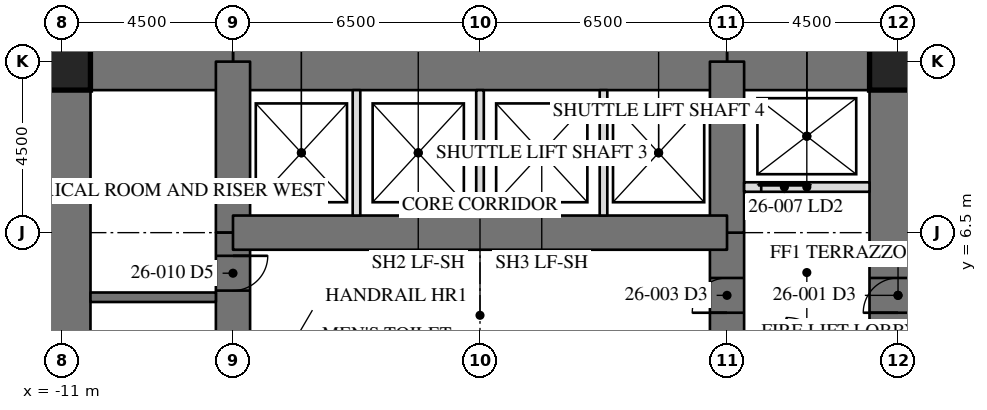
"""IFC4 building model, lengths in metres.
Left out: names, types, materials, properties, quantities, classifications, styles, units other than length and angle.
Written with IfcOpenShell. Run it as: python <this file> out.ifc"""

import sys

from ifc_helpers import new_model, si_unit, direction, frame, frame_2d, origin, origin_2d, place, context, subcontext, project, spatial, rectangle, hollow_rectangle, extrude, element, fill, save


model = new_model("IFC4")
c1 = context("Model", 3, precision=1e-05, world=origin(), true_north=direction((0.0, 1.0)))
c2 = subcontext(c1, "Body", "Model", "MODEL_VIEW")
j1 = project(units=[si_unit("LENGTHUNIT", "METRE"), si_unit("PLANEANGLEUNIT", "RADIAN")], contexts=[c1])
p1 = place(None, origin())
s1 = spatial("IfcSite", under=j1, at=p1, CompositionType="ELEMENT")
p2 = place(p1, origin())
s2 = spatial("IfcBuilding", under=s1, at=p2, CompositionType="ELEMENT")
p3 = place(p2, frame((0.0, 0.0, 113.1)))
s3 = spatial("IfcBuildingStorey", under=s2, at=p3, CompositionType="ELEMENT", Elevation=113.1)
p4 = place(p3, frame((11.0, -11.0, 0.0), z_axis=(0.0, 0.0, 1.0), x_axis=(0.0, 1.0, 0.0)))
e1 = element("IfcWall", 1, at=p4, inside=s3, PredefinedType="SHEAR", context=c2, shape_type="SweptSolid", body=[
    extrude(rectangle(XDim=22.0, YDim=1.5, at=frame_2d((11.0, 0.0))), origin(), (0.0, 0.0, 1.0), 4.1),
])
p5 = place(p4, frame((15.393, 0.0, 0.0)))
e2 = element("IfcOpeningElement", 2, at=p5, cuts=e1, PredefinedType="OPENING", context=c2, shape_type="SweptSolid", body=[
    extrude(rectangle(XDim=0.915, YDim=2.134, at=frame_2d((0.458, 1.067))), frame((0.0, 0.76, 0.0), z_axis=(0.0, -1.0, 0.0), x_axis=(1.0, 0.0, 0.0)), (0.0, 0.0, 1.0), 1.52),
])
p6 = place(p3, frame((-11.0, 11.0, 0.0), z_axis=(0.0, 0.0, 1.0), x_axis=(0.0, -1.0, 0.0)))
e3 = element("IfcWall", 3, at=p6, inside=s3, PredefinedType="SHEAR", context=c2, shape_type="SweptSolid", body=[
    extrude(rectangle(XDim=22.0, YDim=1.5, at=frame_2d((11.0, 0.0))), origin(), (0.0, 0.0, 1.0), 4.1),
])
p7 = place(p6, frame((15.393, 0.0, 0.0)))
e4 = element("IfcOpeningElement", 4, at=p7, cuts=e3, PredefinedType="OPENING", context=c2, shape_type="SweptSolid", body=[
    extrude(rectangle(XDim=0.915, YDim=2.134, at=frame_2d((0.458, 1.067))), frame((0.0, 0.76, 0.0), z_axis=(0.0, -1.0, 0.0), x_axis=(1.0, 0.0, 0.0)), (0.0, 0.0, 1.0), 1.52),
])
p8 = place(p3, frame((11.0, 11.0, 0.0), z_axis=(0.0, 0.0, 1.0), x_axis=(-1.0, 0.0, 0.0)))
e5 = element("IfcWall", 5, at=p8, inside=s3, PredefinedType="SHEAR", context=c2, shape_type="SweptSolid", body=[
    extrude(rectangle(XDim=4.5, YDim=1.5, at=frame_2d((2.25, 0.0))), origin(), (0.0, 0.0, 1.0), 4.1),
])
p9 = place(p3, frame((6.5, 11.0, 0.0), z_axis=(0.0, 0.0, 1.0), x_axis=(-1.0, 0.0, 0.0)))
e6 = element("IfcWall", 6, at=p9, inside=s3, PredefinedType="SHEAR", context=c2, shape_type="SweptSolid", body=[
    extrude(rectangle(XDim=13.0, YDim=1.5, at=frame_2d((6.5, 0.0))), origin(), (0.0, 0.0, 1.0), 4.1),
])
p10 = place(p3, frame((-6.5, 11.0, 0.0), z_axis=(0.0, 0.0, 1.0), x_axis=(-1.0, 0.0, 0.0)))
e7 = element("IfcWall", 7, at=p10, inside=s3, PredefinedType="SHEAR", context=c2, shape_type="SweptSolid", body=[
    extrude(rectangle(XDim=4.5, YDim=1.5, at=frame_2d((2.25, 0.0))), origin(), (0.0, 0.0, 1.0), 4.1),
])
p11 = place(p3, frame((6.5, -6.5, 0.0), z_axis=(0.0, 0.0, 1.0), x_axis=(0.0, 1.0, 0.0)))
e8 = element("IfcWall", 8, at=p11, inside=s3, PredefinedType="SHEAR", context=c2, shape_type="SweptSolid", body=[
    extrude(rectangle(XDim=13.0, YDim=0.9, at=frame_2d((6.5, 0.0))), origin(), (0.0, 0.0, 1.0), 4.1),
])
p12 = place(p11, frame((10.893, 0.0, 0.0)))
e9 = element("IfcOpeningElement", 9, at=p12, cuts=e8, PredefinedType="OPENING", context=c2, shape_type="SweptSolid", body=[
    extrude(rectangle(XDim=0.915, YDim=2.134, at=frame_2d((0.458, 1.067))), frame((0.0, 0.46, 0.0), z_axis=(0.0, -1.0, 0.0), x_axis=(1.0, 0.0, 0.0)), (0.0, 0.0, 1.0), 0.92),
])
p13 = place(p11, frame((0.61, 0.0, 0.0)))
e10 = element("IfcOpeningElement", 10, at=p13, cuts=e8, PredefinedType="OPENING", context=c2, shape_type="SweptSolid", body=[
    extrude(rectangle(XDim=0.915, YDim=2.134, at=frame_2d((0.458, 1.067))), frame((0.0, 0.46, 0.0), z_axis=(0.0, -1.0, 0.0), x_axis=(1.0, 0.0, 0.0)), (0.0, 0.0, 1.0), 0.92),
])
for number, where, z_axis, x_axis in (
    (11, (6.5, 6.5, 0.0), (0.0, 0.0, 1.0), (0.0, 1.0, 0.0)),
    (12, (-6.5, 11.0, 0.0), (0.0, 0.0, 1.0), (0.0, -1.0, 0.0)),
):
    element("IfcWall", number, at=place(p3, frame(where, z_axis=z_axis, x_axis=x_axis)), inside=s3, PredefinedType="SHEAR", context=c2, shape_type="SweptSolid", body=[
        extrude(rectangle(XDim=4.5, YDim=0.9, at=frame_2d((2.25, 0.0))), origin(), (0.0, 0.0, 1.0), 4.1),
    ])
p14 = place(p3, frame((-6.5, 6.5, 0.0), z_axis=(0.0, 0.0, 1.0), x_axis=(0.0, -1.0, 0.0)))
e13 = element("IfcWall", 13, at=p14, inside=s3, PredefinedType="SHEAR", context=c2, shape_type="SweptSolid", body=[
    extrude(rectangle(XDim=13.0, YDim=0.9, at=frame_2d((6.5, 0.0))), origin(), (0.0, 0.0, 1.0), 4.1),
])
p15 = place(p14, frame((10.893, 0.0, 0.0)))
e14 = element("IfcOpeningElement", 14, at=p15, cuts=e13, PredefinedType="OPENING", context=c2, shape_type="SweptSolid", body=[
    extrude(rectangle(XDim=0.915, YDim=2.134, at=frame_2d((0.458, 1.067))), frame((0.0, 0.46, 0.0), z_axis=(0.0, -1.0, 0.0), x_axis=(1.0, 0.0, 0.0)), (0.0, 0.0, 1.0), 0.92),
])
p16 = place(p14, frame((0.61, 0.0, 0.0)))
e15 = element("IfcOpeningElement", 15, at=p16, cuts=e13, PredefinedType="OPENING", context=c2, shape_type="SweptSolid", body=[
    extrude(rectangle(XDim=0.915, YDim=2.134, at=frame_2d((0.458, 1.067))), frame((0.0, 0.46, 0.0), z_axis=(0.0, -1.0, 0.0), x_axis=(1.0, 0.0, 0.0)), (0.0, 0.0, 1.0), 0.92),
])
p17 = place(p3, frame((6.5, 6.5, 0.0), z_axis=(0.0, 0.0, 1.0), x_axis=(-1.0, 0.0, 0.0)))
e16 = element("IfcWall", 16, at=p17, inside=s3, PredefinedType="SHEAR", context=c2, shape_type="SweptSolid", body=[
    extrude(rectangle(XDim=13.0, YDim=0.9, at=frame_2d((6.5, 0.0))), origin(), (0.0, 0.0, 1.0), 4.1),
])
for number, where, z_axis, x_axis in (
    (17, (11.0, 11.0, 0.0), (0.0, 0.0, 1.0), (1.0, 0.0, 0.0)),
    (18, (-11.0, 11.0, 0.0), (0.0, 0.0, 1.0), (1.0, 0.0, 0.0)),
):
    element("IfcColumn", number, at=place(p3, frame(where, z_axis=z_axis, x_axis=x_axis)), inside=s3, PredefinedType="COLUMN", context=c2, shape_type="SweptSolid", body=[
        extrude(hollow_rectangle(XDim=1.499, YDim=1.499, WallThickness=0.102, at=origin_2d()), origin(), (0.0, 0.0, 1.0), 4.1),
    ])
p18 = place(p3, frame((-6.95, 4.8, 0.0), z_axis=(0.0, 0.0, 1.0), x_axis=(-1.0, 0.0, 0.0)))
e19 = element("IfcWall", 19, at=p18, inside=s3, PredefinedType="SOLIDWALL", context=c2, shape_type="SweptSolid", body=[
    extrude(rectangle(XDim=3.3, YDim=0.25, at=frame_2d((1.65, 0.0))), origin(), (0.0, 0.0, 1.0), 3.91),
])
p19 = place(p3, frame((6.95, 7.7, 0.0), z_axis=(0.0, 0.0, 1.0), x_axis=(1.0, 0.0, 0.0)))
e20 = element("IfcWall", 20, at=p19, inside=s3, PredefinedType="PARTITIONING", context=c2, shape_type="SweptSolid", body=[
    extrude(rectangle(XDim=3.3, YDim=0.25, at=frame_2d((1.65, 0.0))), origin(), (0.0, 0.0, 1.0), 3.91),
])
p20 = place(p19, frame((0.45, 0.0, 0.0)))
e21 = element("IfcOpeningElement", 21, at=p20, cuts=e20, PredefinedType="OPENING", context=c2, shape_type="SweptSolid", body=[
    extrude(rectangle(XDim=1.219, YDim=2.134, at=frame_2d((0.609, 1.067))), frame((0.0, 0.135, 0.0), z_axis=(0.0, -1.0, 0.0), x_axis=(1.0, 0.0, 0.0)), (0.0, 0.0, 1.0), 0.27),
])
for number, where, z_axis, x_axis in (
    (22, (-3.25, 6.95, 0.0), (0.0, 0.0, 1.0), (0.0, 1.0, 0.0)),
    (23, (0.0, 6.95, 0.0), (0.0, 0.0, 1.0), (0.0, 1.0, 0.0)),
    (24, (3.25, 6.95, 0.0), (0.0, 0.0, 1.0), (0.0, 1.0, 0.0)),
):
    element("IfcWall", number, at=place(p3, frame(where, z_axis=z_axis, x_axis=x_axis)), inside=s3, PredefinedType="PARTITIONING", context=c2, shape_type="SweptSolid", body=[
        extrude(rectangle(XDim=3.3, YDim=0.2, at=frame_2d((1.65, 0.0))), origin(), (0.0, 0.0, 1.0), 3.91),
    ])
p21 = place(p12, origin())
e25 = element("IfcDoor", 25, at=p21, inside=s3, OperationType="SINGLE_SWING_RIGHT", PredefinedType="DOOR", context=c2, shape_type="SweptSolid", body=[
    extrude(rectangle(XDim=0.915, YDim=2.134, at=frame_2d((0.458, 1.067))), frame((0.0, -0.375, 0.0), z_axis=(0.0, -1.0, 0.0), x_axis=(1.0, 0.0, 0.0)), (0.0, 0.0, 1.0), 0.05),
])
fill(e9, e25)
p22 = place(p20, origin())
e26 = element("IfcDoor", 26, at=p22, inside=s3, OperationType="SLIDING_TO_LEFT", PredefinedType="DOOR", context=c2, shape_type="SweptSolid", body=[
    extrude(rectangle(XDim=1.219, YDim=2.134, at=frame_2d((0.609, 1.067))), frame((0.0, 0.025, 0.0), z_axis=(0.0, -1.0, 0.0), x_axis=(1.0, 0.0, 0.0)), (0.0, 0.0, 1.0), 0.05),
])
fill(e21, e26)
p23 = place(p16, origin())
e27 = element("IfcDoor", 27, at=p23, inside=s3, OperationType="SINGLE_SWING_RIGHT", PredefinedType="DOOR", context=c2, shape_type="SweptSolid", body=[
    extrude(rectangle(XDim=0.915, YDim=2.134, at=frame_2d((0.458, 1.067))), frame((0.0, -0.375, 0.0), z_axis=(0.0, -1.0, 0.0), x_axis=(1.0, 0.0, 0.0)), (0.0, 0.0, 1.0), 0.05),
])
fill(e15, e27)
save(model, sys.argv[1])
